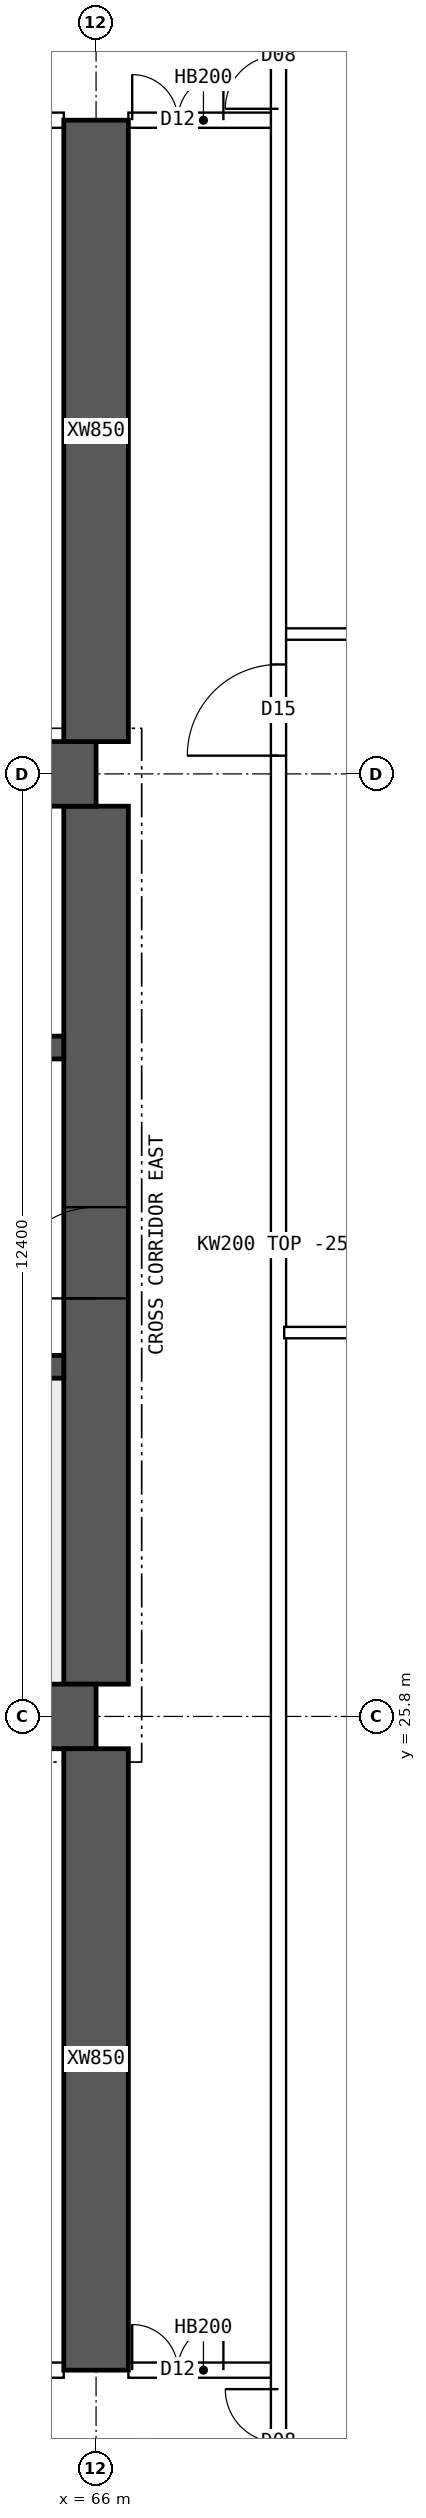
"""IFC4 building model, lengths in metres.
Left out: names, types, materials, properties, quantities, classifications, styles, units other than length and angle.
Written with IfcOpenShell. Run it as: python <this file> out.ifc"""

import sys

from ifc_helpers import new_model, si_unit, direction, frame, frame_2d, origin, place, context, subcontext, project, spatial, polyline, rectangle, outline, extrude, element, fill, save


model = new_model("IFC4")
c1 = context("Model", 3, precision=1e-05, world=origin(), true_north=direction((0.0, 1.0)))
c2 = subcontext(c1, "Body", "Model", "MODEL_VIEW")
j1 = project(units=[si_unit("LENGTHUNIT", "METRE"), si_unit("PLANEANGLEUNIT", "RADIAN")], contexts=[c1])
p1 = place(None, origin())
s1 = spatial("IfcSite", under=j1, at=p1, CompositionType="ELEMENT")
p2 = place(p1, origin())
s2 = spatial("IfcBuilding", under=s1, at=p2, CompositionType="ELEMENT")
p3 = place(p2, frame((0.0, 0.0, 193.6)))
s3 = spatial("IfcBuildingStorey", under=s2, at=p3, CompositionType="ELEMENT", Elevation=193.6)
for number, where, z_axis, x_axis in (
    (1, (18.0, 25.8, 0.0), (0.0, 0.0, 1.0), (1.0, 0.0, 0.0)),
    (2, (18.0, 38.2, 0.0), (0.0, 0.0, 1.0), (1.0, 0.0, 0.0)),
):
    element("IfcWall", number, at=place(p3, frame(where, z_axis=z_axis, x_axis=x_axis)), inside=s3, PredefinedType="SHEAR", context=c2, shape_type="SweptSolid", body=[
        extrude(rectangle(XDim=48.0, YDim=0.85, at=frame_2d((24.0, 0.0))), origin(), (0.0, 0.0, 1.0), 3.75),
    ])
p4 = place(p3, frame((66.0, 26.225, 0.0), z_axis=(0.0, 0.0, 1.0), x_axis=(0.0, 1.0, 0.0)))
e3 = element("IfcWall", 3, at=p4, inside=s3, PredefinedType="SHEAR", context=c2, shape_type="SweptSolid", body=[
    extrude(rectangle(XDim=11.55, YDim=0.85, at=frame_2d((5.775, 0.0))), origin(), (0.0, 0.0, 1.0), 3.75),
])
p5 = place(p4, frame((5.075, 0.0, 0.0)))
e4 = element("IfcOpeningElement", 4, at=p5, cuts=e3, PredefinedType="OPENING", context=c2, shape_type="SweptSolid", body=[
    extrude(rectangle(XDim=1.2, YDim=2.1, at=frame_2d((0.6, 1.05))), frame((0.0, 0.435, 0.0), z_axis=(0.0, -1.0, 0.0), x_axis=(1.0, 0.0, 0.0)), (0.0, 0.0, 1.0), 0.87),
])
p6 = place(p3, frame((18.425, 30.4, 0.0), z_axis=(0.0, 0.0, 1.0), x_axis=(1.0, 0.0, 0.0)))
e5 = element("IfcWall", 5, at=p6, inside=s3, PredefinedType="SHEAR", context=c2, shape_type="SweptSolid", body=[
    extrude(rectangle(XDim=47.15, YDim=0.3, at=frame_2d((23.575, 0.0))), origin(), (0.0, 0.0, 1.0), 3.75),
])
p7 = place(p6, frame((0.4, 0.0, 0.0)))
e6 = element("IfcOpeningElement", 6, at=p7, cuts=e5, PredefinedType="OPENING", context=c2, shape_type="SweptSolid", body=[
    extrude(rectangle(XDim=1.0, YDim=2.1, at=frame_2d((0.5, 1.05))), frame((0.0, 0.16, 0.0), z_axis=(0.0, -1.0, 0.0), x_axis=(1.0, 0.0, 0.0)), (0.0, 0.0, 1.0), 0.32),
])
p8 = place(p6, frame((45.75, 0.0, 0.0)))
e7 = element("IfcOpeningElement", 7, at=p8, cuts=e5, PredefinedType="OPENING", context=c2, shape_type="SweptSolid", body=[
    extrude(rectangle(XDim=1.0, YDim=2.1, at=frame_2d((0.5, 1.05))), frame((0.0, 0.16, 0.0), z_axis=(0.0, -1.0, 0.0), x_axis=(1.0, 0.0, 0.0)), (0.0, 0.0, 1.0), 0.32),
])
p9 = place(p6, frame((8.325, 0.0, 0.0)))
e8 = element("IfcOpeningElement", 8, at=p9, cuts=e5, PredefinedType="OPENING", context=c2, shape_type="SweptSolid", body=[
    extrude(rectangle(XDim=1.1, YDim=2.1, at=frame_2d((0.55, 1.05))), frame((0.0, 0.16, 0.0), z_axis=(0.0, -1.0, 0.0), x_axis=(1.0, 0.0, 0.0)), (0.0, 0.0, 1.0), 0.32),
])
p10 = place(p6, frame((10.925, 0.0, 0.0)))
e9 = element("IfcOpeningElement", 9, at=p10, cuts=e5, PredefinedType="OPENING", context=c2, shape_type="SweptSolid", body=[
    extrude(rectangle(XDim=1.1, YDim=2.1, at=frame_2d((0.55, 1.05))), frame((0.0, 0.16, 0.0), z_axis=(0.0, -1.0, 0.0), x_axis=(1.0, 0.0, 0.0)), (0.0, 0.0, 1.0), 0.32),
])
p11 = place(p6, frame((13.525, 0.0, 0.0)))
e10 = element("IfcOpeningElement", 10, at=p11, cuts=e5, PredefinedType="OPENING", context=c2, shape_type="SweptSolid", body=[
    extrude(rectangle(XDim=1.1, YDim=2.1, at=frame_2d((0.55, 1.05))), frame((0.0, 0.16, 0.0), z_axis=(0.0, -1.0, 0.0), x_axis=(1.0, 0.0, 0.0)), (0.0, 0.0, 1.0), 0.32),
])
p12 = place(p6, frame((16.125, 0.0, 0.0)))
e11 = element("IfcOpeningElement", 11, at=p12, cuts=e5, PredefinedType="OPENING", context=c2, shape_type="SweptSolid", body=[
    extrude(rectangle(XDim=1.1, YDim=2.1, at=frame_2d((0.55, 1.05))), frame((0.0, 0.16, 0.0), z_axis=(0.0, -1.0, 0.0), x_axis=(1.0, 0.0, 0.0)), (0.0, 0.0, 1.0), 0.32),
])
p13 = place(p6, frame((18.9, 0.0, 0.0)))
e12 = element("IfcOpeningElement", 12, at=p13, cuts=e5, PredefinedType="OPENING", context=c2, shape_type="SweptSolid", body=[
    extrude(rectangle(XDim=0.9, YDim=2.1, at=frame_2d((0.45, 1.05))), frame((0.0, 0.16, 0.0), z_axis=(0.0, -1.0, 0.0), x_axis=(1.0, 0.0, 0.0)), (0.0, 0.0, 1.0), 0.32),
])
p14 = place(p6, frame((30.192, 0.0, 0.0)))
e13 = element("IfcOpeningElement", 13, at=p14, cuts=e5, PredefinedType="OPENING", context=c2, shape_type="SweptSolid", body=[
    extrude(rectangle(XDim=1.1, YDim=2.1, at=frame_2d((0.55, 1.05))), frame((0.0, 0.16, 0.0), z_axis=(0.0, -1.0, 0.0), x_axis=(1.0, 0.0, 0.0)), (0.0, 0.0, 1.0), 0.32),
])
p15 = place(p6, frame((33.725, 0.0, 0.0)))
e14 = element("IfcOpeningElement", 14, at=p15, cuts=e5, PredefinedType="OPENING", context=c2, shape_type="SweptSolid", body=[
    extrude(rectangle(XDim=1.1, YDim=2.1, at=frame_2d((0.55, 1.05))), frame((0.0, 0.16, 0.0), z_axis=(0.0, -1.0, 0.0), x_axis=(1.0, 0.0, 0.0)), (0.0, 0.0, 1.0), 0.32),
])
p16 = place(p6, frame((37.258, 0.0, 0.0)))
e15 = element("IfcOpeningElement", 15, at=p16, cuts=e5, PredefinedType="OPENING", context=c2, shape_type="SweptSolid", body=[
    extrude(rectangle(XDim=1.1, YDim=2.1, at=frame_2d((0.55, 1.05))), frame((0.0, 0.16, 0.0), z_axis=(0.0, -1.0, 0.0), x_axis=(1.0, 0.0, 0.0)), (0.0, 0.0, 1.0), 0.32),
])
p17 = place(p3, frame((18.425, 34.6, 0.0), z_axis=(0.0, 0.0, 1.0), x_axis=(1.0, 0.0, 0.0)))
e16 = element("IfcWall", 16, at=p17, inside=s3, PredefinedType="SHEAR", context=c2, shape_type="SweptSolid", body=[
    extrude(rectangle(XDim=47.15, YDim=0.3, at=frame_2d((23.575, 0.0))), origin(), (0.0, 0.0, 1.0), 3.75),
])
p18 = place(p17, frame((0.9, 0.0, 0.0)))
e17 = element("IfcOpeningElement", 17, at=p18, cuts=e16, PredefinedType="OPENING", context=c2, shape_type="SweptSolid", body=[
    extrude(rectangle(XDim=1.1, YDim=2.1, at=frame_2d((0.55, 1.05))), frame((0.0, 0.16, 0.0), z_axis=(0.0, -1.0, 0.0), x_axis=(1.0, 0.0, 0.0)), (0.0, 0.0, 1.0), 0.32),
])
p19 = place(p17, frame((45.15, 0.0, 0.0)))
e18 = element("IfcOpeningElement", 18, at=p19, cuts=e16, PredefinedType="OPENING", context=c2, shape_type="SweptSolid", body=[
    extrude(rectangle(XDim=1.1, YDim=2.1, at=frame_2d((0.55, 1.05))), frame((0.0, 0.16, 0.0), z_axis=(0.0, -1.0, 0.0), x_axis=(1.0, 0.0, 0.0)), (0.0, 0.0, 1.0), 0.32),
])
p20 = place(p17, frame((4.175, 0.0, 0.0)))
e19 = element("IfcOpeningElement", 19, at=p20, cuts=e16, PredefinedType="OPENING", context=c2, shape_type="SweptSolid", body=[
    extrude(rectangle(XDim=0.9, YDim=2.1, at=frame_2d((0.45, 1.05))), frame((0.0, 0.16, 0.0), z_axis=(0.0, -1.0, 0.0), x_axis=(1.0, 0.0, 0.0)), (0.0, 0.0, 1.0), 0.32),
])
p21 = place(p17, frame((42.075, 0.0, 0.0)))
e20 = element("IfcOpeningElement", 20, at=p21, cuts=e16, PredefinedType="OPENING", context=c2, shape_type="SweptSolid", body=[
    extrude(rectangle(XDim=0.9, YDim=2.1, at=frame_2d((0.45, 1.05))), frame((0.0, 0.16, 0.0), z_axis=(0.0, -1.0, 0.0), x_axis=(1.0, 0.0, 0.0)), (0.0, 0.0, 1.0), 0.32),
])
p22 = place(p17, frame((8.95, 0.0, 0.0)))
e21 = element("IfcOpeningElement", 21, at=p22, cuts=e16, PredefinedType="OPENING", context=c2, shape_type="SweptSolid", body=[
    extrude(rectangle(XDim=0.9, YDim=2.1, at=frame_2d((0.45, 1.05))), frame((0.0, 0.16, 0.0), z_axis=(0.0, -1.0, 0.0), x_axis=(1.0, 0.0, 0.0)), (0.0, 0.0, 1.0), 0.32),
])
p23 = place(p17, frame((12.924, 0.0, 0.0)))
e22 = element("IfcOpeningElement", 22, at=p23, cuts=e16, PredefinedType="OPENING", context=c2, shape_type="SweptSolid", body=[
    extrude(rectangle(XDim=0.9, YDim=2.1, at=frame_2d((0.45, 1.05))), frame((0.0, 0.16, 0.0), z_axis=(0.0, -1.0, 0.0), x_axis=(1.0, 0.0, 0.0)), (0.0, 0.0, 1.0), 0.32),
])
p24 = place(p17, frame((16.571, 0.0, 0.0)))
e23 = element("IfcOpeningElement", 23, at=p24, cuts=e16, PredefinedType="OPENING", context=c2, shape_type="SweptSolid", body=[
    extrude(rectangle(XDim=0.9, YDim=2.1, at=frame_2d((0.45, 1.05))), frame((0.0, 0.16, 0.0), z_axis=(0.0, -1.0, 0.0), x_axis=(1.0, 0.0, 0.0)), (0.0, 0.0, 1.0), 0.32),
])
p25 = place(p17, frame((20.33, 0.0, 0.0)))
e24 = element("IfcOpeningElement", 24, at=p25, cuts=e16, PredefinedType="OPENING", context=c2, shape_type="SweptSolid", body=[
    extrude(rectangle(XDim=0.9, YDim=2.1, at=frame_2d((0.45, 1.05))), frame((0.0, 0.16, 0.0), z_axis=(0.0, -1.0, 0.0), x_axis=(1.0, 0.0, 0.0)), (0.0, 0.0, 1.0), 0.32),
])
p26 = place(p17, frame((24.736, 0.0, 0.0)))
e25 = element("IfcOpeningElement", 25, at=p26, cuts=e16, PredefinedType="OPENING", context=c2, shape_type="SweptSolid", body=[
    extrude(rectangle(XDim=0.9, YDim=2.1, at=frame_2d((0.45, 1.05))), frame((0.0, 0.16, 0.0), z_axis=(0.0, -1.0, 0.0), x_axis=(1.0, 0.0, 0.0)), (0.0, 0.0, 1.0), 0.32),
])
p27 = place(p17, frame((27.533, 0.0, 0.0)))
e26 = element("IfcOpeningElement", 26, at=p27, cuts=e16, PredefinedType="OPENING", context=c2, shape_type="SweptSolid", body=[
    extrude(rectangle(XDim=0.9, YDim=2.1, at=frame_2d((0.45, 1.05))), frame((0.0, 0.16, 0.0), z_axis=(0.0, -1.0, 0.0), x_axis=(1.0, 0.0, 0.0)), (0.0, 0.0, 1.0), 0.32),
])
p28 = place(p17, frame((29.703, 0.0, 0.0)))
e27 = element("IfcOpeningElement", 27, at=p28, cuts=e16, PredefinedType="OPENING", context=c2, shape_type="SweptSolid", body=[
    extrude(rectangle(XDim=0.9, YDim=2.1, at=frame_2d((0.45, 1.05))), frame((0.0, 0.16, 0.0), z_axis=(0.0, -1.0, 0.0), x_axis=(1.0, 0.0, 0.0)), (0.0, 0.0, 1.0), 0.32),
])
p29 = place(p17, frame((33.502, 0.0, 0.0)))
e28 = element("IfcOpeningElement", 28, at=p29, cuts=e16, PredefinedType="OPENING", context=c2, shape_type="SweptSolid", body=[
    extrude(rectangle(XDim=0.9, YDim=2.1, at=frame_2d((0.45, 1.05))), frame((0.0, 0.16, 0.0), z_axis=(0.0, -1.0, 0.0), x_axis=(1.0, 0.0, 0.0)), (0.0, 0.0, 1.0), 0.32),
])
p30 = place(p17, frame((37.453, 0.0, 0.0)))
e29 = element("IfcOpeningElement", 29, at=p30, cuts=e16, PredefinedType="OPENING", context=c2, shape_type="SweptSolid", body=[
    extrude(rectangle(XDim=0.9, YDim=2.1, at=frame_2d((0.45, 1.05))), frame((0.0, 0.16, 0.0), z_axis=(0.0, -1.0, 0.0), x_axis=(1.0, 0.0, 0.0)), (0.0, 0.0, 1.0), 0.32),
])
for number, where, z_axis, x_axis in (
    (30, (66.0, 17.2, 0.0), (0.0, 0.0, 1.0), (0.0, 1.0, 0.0)),
    (31, (66.0, 38.625, 0.0), (0.0, 0.0, 1.0), (0.0, 1.0, 0.0)),
):
    element("IfcWall", number, at=place(p3, frame(where, z_axis=z_axis, x_axis=x_axis)), inside=s3, PredefinedType="SHEAR", context=c2, shape_type="SweptSolid", body=[
        extrude(rectangle(XDim=8.175, YDim=0.85, at=frame_2d((4.087, 0.0))), origin(), (0.0, 0.0, 1.0), 3.75),
    ])
p31 = place(p3, frame((60.425, 17.2, 0.0), z_axis=(0.0, 0.0, 1.0), x_axis=(1.0, 0.0, 0.0)))
e32 = element("IfcWall", 32, at=p31, inside=s3, PredefinedType="SOLIDWALL", context=c2, shape_type="SweptSolid", body=[
    extrude(rectangle(XDim=5.15, YDim=0.2, at=frame_2d((2.575, 0.0))), origin(), (0.0, 0.0, 1.0), 3.5),
])
p32 = place(p31, frame((0.15, 0.0, 0.0)))
e33 = element("IfcOpeningElement", 33, at=p32, cuts=e32, PredefinedType="OPENING", context=c2, shape_type="SweptSolid", body=[
    extrude(rectangle(XDim=0.9, YDim=2.1, at=frame_2d((0.45, 1.05))), frame((0.0, 0.11, 0.0), z_axis=(0.0, -1.0, 0.0), x_axis=(1.0, 0.0, 0.0)), (0.0, 0.0, 1.0), 0.22),
])
p33 = place(p31, frame((3.655, 0.0, 0.0)))
e34 = element("IfcOpeningElement", 34, at=p33, cuts=e32, PredefinedType="OPENING", context=c2, shape_type="SweptSolid", body=[
    extrude(rectangle(XDim=0.9, YDim=2.1, at=frame_2d((0.45, 1.05))), frame((0.0, 0.11, 0.0), z_axis=(0.0, -1.0, 0.0), x_axis=(1.0, 0.0, 0.0)), (0.0, 0.0, 1.0), 0.22),
])
p34 = place(p3, frame((66.425, 17.2, 0.0), z_axis=(0.0, 0.0, 1.0), x_axis=(1.0, 0.0, 0.0)))
e35 = element("IfcWall", 35, at=p34, inside=s3, PredefinedType="SOLIDWALL", context=c2, shape_type="SweptSolid", body=[
    extrude(rectangle(XDim=1.975, YDim=0.2, at=frame_2d((0.987, 0.0))), origin(), (0.0, 0.0, 1.0), 3.5),
])
p35 = place(p34, frame((0.05, 0.0, 0.0)))
e36 = element("IfcOpeningElement", 36, at=p35, cuts=e35, PredefinedType="OPENING", context=c2, shape_type="SweptSolid", body=[
    extrude(rectangle(XDim=1.2, YDim=2.1, at=frame_2d((0.6, 1.05))), frame((0.0, 0.11, 0.0), z_axis=(0.0, -1.0, 0.0), x_axis=(1.0, 0.0, 0.0)), (0.0, 0.0, 1.0), 0.22),
])
p36 = place(p3, frame((60.425, 46.8, 0.0), z_axis=(0.0, 0.0, 1.0), x_axis=(1.0, 0.0, 0.0)))
e37 = element("IfcWall", 37, at=p36, inside=s3, PredefinedType="SOLIDWALL", context=c2, shape_type="SweptSolid", body=[
    extrude(rectangle(XDim=5.15, YDim=0.2, at=frame_2d((2.575, 0.0))), origin(), (0.0, 0.0, 1.0), 3.5),
])
p37 = place(p36, frame((0.45, 0.0, 0.0)))
e38 = element("IfcOpeningElement", 38, at=p37, cuts=e37, PredefinedType="OPENING", context=c2, shape_type="SweptSolid", body=[
    extrude(rectangle(XDim=1.0, YDim=2.1, at=frame_2d((0.5, 1.05))), frame((0.0, 0.11, 0.0), z_axis=(0.0, -1.0, 0.0), x_axis=(1.0, 0.0, 0.0)), (0.0, 0.0, 1.0), 0.22),
])
p38 = place(p3, frame((66.425, 46.8, 0.0), z_axis=(0.0, 0.0, 1.0), x_axis=(1.0, 0.0, 0.0)))
e39 = element("IfcWall", 39, at=p38, inside=s3, PredefinedType="SOLIDWALL", context=c2, shape_type="SweptSolid", body=[
    extrude(rectangle(XDim=1.975, YDim=0.2, at=frame_2d((0.987, 0.0))), origin(), (0.0, 0.0, 1.0), 3.5),
])
p39 = place(p38, frame((0.05, 0.0, 0.0)))
e40 = element("IfcOpeningElement", 40, at=p39, cuts=e39, PredefinedType="OPENING", context=c2, shape_type="SweptSolid", body=[
    extrude(rectangle(XDim=1.2, YDim=2.1, at=frame_2d((0.6, 1.05))), frame((0.0, 0.11, 0.0), z_axis=(0.0, -1.0, 0.0), x_axis=(1.0, 0.0, 0.0)), (0.0, 0.0, 1.0), 0.22),
])
p40 = place(p3, frame((68.475, 30.85, 0.0), z_axis=(0.0, 0.0, 1.0), x_axis=(1.0, 0.0, 0.0)))
e41 = element("IfcWall", 41, at=p40, inside=s3, PredefinedType="PARTITIONING", context=c2, shape_type="SweptSolid", body=[
    extrude(outline(polyline([(0.0, 0.0), (6.82, 0.0), (6.82, 3.5), (3.827, 3.5), (3.825, 3.05), (3.227, 3.05), (3.225, 3.5), (0.0, 3.5), (0.0, 0.0)])), frame((0.0, 0.075, 0.0), z_axis=(0.0, -1.0, 0.0), x_axis=(1.0, 0.0, 0.0)), (0.0, 0.0, 1.0), 0.15),
])
p41 = place(p3, frame((68.4, 10.446, 0.0), z_axis=(0.0, 0.0, 1.0), x_axis=(0.0, 1.0, 0.0)))
e42 = element("IfcWall", 42, at=p41, inside=s3, PredefinedType="SOLIDWALL", context=c2, shape_type="SweptSolid", body=[
    extrude(rectangle(XDim=43.107, YDim=0.2, at=frame_2d((21.554, 0.0))), origin(), (0.0, 0.0, 1.0), 3.5),
])
p42 = place(p41, frame((27.994, 0.0, 0.0)))
e43 = element("IfcOpeningElement", 43, at=p42, cuts=e42, PredefinedType="OPENING", context=c2, shape_type="SweptSolid", body=[
    extrude(rectangle(XDim=1.2, YDim=2.1, at=frame_2d((0.6, 1.05))), frame((0.0, 0.11, 0.0), z_axis=(0.0, -1.0, 0.0), x_axis=(1.0, 0.0, 0.0)), (0.0, 0.0, 1.0), 0.22),
])
p43 = place(p41, frame((5.104, 0.0, 0.0)))
e44 = element("IfcOpeningElement", 44, at=p43, cuts=e42, PredefinedType="OPENING", context=c2, shape_type="SweptSolid", body=[
    extrude(rectangle(XDim=1.4, YDim=2.1, at=frame_2d((0.7, 1.05))), frame((0.0, 0.11, 0.0), z_axis=(0.0, -1.0, 0.0), x_axis=(1.0, 0.0, 0.0)), (0.0, 0.0, 1.0), 0.22),
])
p44 = place(p41, frame((36.504, 0.0, 0.0)))
e45 = element("IfcOpeningElement", 45, at=p44, cuts=e42, PredefinedType="OPENING", context=c2, shape_type="SweptSolid", body=[
    extrude(rectangle(XDim=1.4, YDim=2.1, at=frame_2d((0.7, 1.05))), frame((0.0, 0.11, 0.0), z_axis=(0.0, -1.0, 0.0), x_axis=(1.0, 0.0, 0.0)), (0.0, 0.0, 1.0), 0.22),
])
p45 = place(p3, frame((68.475, 40.04, 0.0), z_axis=(0.0, 0.0, 1.0), x_axis=(1.0, 0.0, 0.0)))
e46 = element("IfcWall", 46, at=p45, inside=s3, PredefinedType="PARTITIONING", context=c2, shape_type="SweptSolid", body=[
    extrude(rectangle(XDim=6.82, YDim=0.15, at=frame_2d((3.41, 0.0))), origin(), (0.0, 0.0, 1.0), 3.5),
])
p46 = place(p5, origin())
e47 = element("IfcDoor", 47, at=p46, inside=s3, OperationType="SINGLE_SWING_LEFT", PredefinedType="DOOR", context=c2, shape_type="SweptSolid", body=[
    extrude(rectangle(XDim=1.2, YDim=2.1, at=frame_2d((0.6, 1.05))), frame((0.0, 0.025, 0.0), z_axis=(0.0, -1.0, 0.0), x_axis=(1.0, 0.0, 0.0)), (0.0, 0.0, 1.0), 0.05),
])
fill(e4, e47)
p47 = place(p35, origin())
e48 = element("IfcDoor", 48, at=p47, inside=s3, OperationType="DOUBLE_DOOR_SINGLE_SWING", PredefinedType="DOOR", context=c2, shape_type="SweptSolid", body=[
    extrude(rectangle(XDim=1.2, YDim=2.1, at=frame_2d((0.6, 1.05))), frame((0.0, 0.025, 0.0), z_axis=(0.0, -1.0, 0.0), x_axis=(1.0, 0.0, 0.0)), (0.0, 0.0, 1.0), 0.05),
])
fill(e36, e48)
p48 = place(p39, origin())
e49 = element("IfcDoor", 49, at=p48, inside=s3, OperationType="DOUBLE_DOOR_SINGLE_SWING", PredefinedType="DOOR", context=c2, shape_type="SweptSolid", body=[
    extrude(rectangle(XDim=1.2, YDim=2.1, at=frame_2d((0.6, 1.05))), frame((0.0, 0.025, 0.0), z_axis=(0.0, -1.0, 0.0), x_axis=(1.0, 0.0, 0.0)), (0.0, 0.0, 1.0), 0.05),
])
fill(e40, e49)
p49 = place(p42, origin())
e50 = element("IfcDoor", 50, at=p49, inside=s3, OperationType="SINGLE_SWING_LEFT", PredefinedType="DOOR", context=c2, shape_type="SweptSolid", body=[
    extrude(rectangle(XDim=1.2, YDim=2.1, at=frame_2d((0.6, 1.05))), frame((0.0, 0.025, 0.0), z_axis=(0.0, -1.0, 0.0), x_axis=(1.0, 0.0, 0.0)), (0.0, 0.0, 1.0), 0.05),
])
fill(e43, e50)
p50 = place(p43, origin())
e51 = element("IfcDoor", 51, at=p50, inside=s3, OperationType="DOUBLE_DOOR_SINGLE_SWING", PredefinedType="DOOR", context=c2, shape_type="SweptSolid", body=[
    extrude(rectangle(XDim=1.4, YDim=2.1, at=frame_2d((0.7, 1.05))), frame((0.0, 0.025, 0.0), z_axis=(0.0, -1.0, 0.0), x_axis=(1.0, 0.0, 0.0)), (0.0, 0.0, 1.0), 0.05),
])
fill(e44, e51)
p51 = place(p44, origin())
e52 = element("IfcDoor", 52, at=p51, inside=s3, OperationType="DOUBLE_DOOR_SINGLE_SWING", PredefinedType="DOOR", context=c2, shape_type="SweptSolid", body=[
    extrude(rectangle(XDim=1.4, YDim=2.1, at=frame_2d((0.7, 1.05))), frame((0.0, 0.025, 0.0), z_axis=(0.0, -1.0, 0.0), x_axis=(1.0, 0.0, 0.0)), (0.0, 0.0, 1.0), 0.05),
])
fill(e45, e52)
save(model, sys.argv[1])
